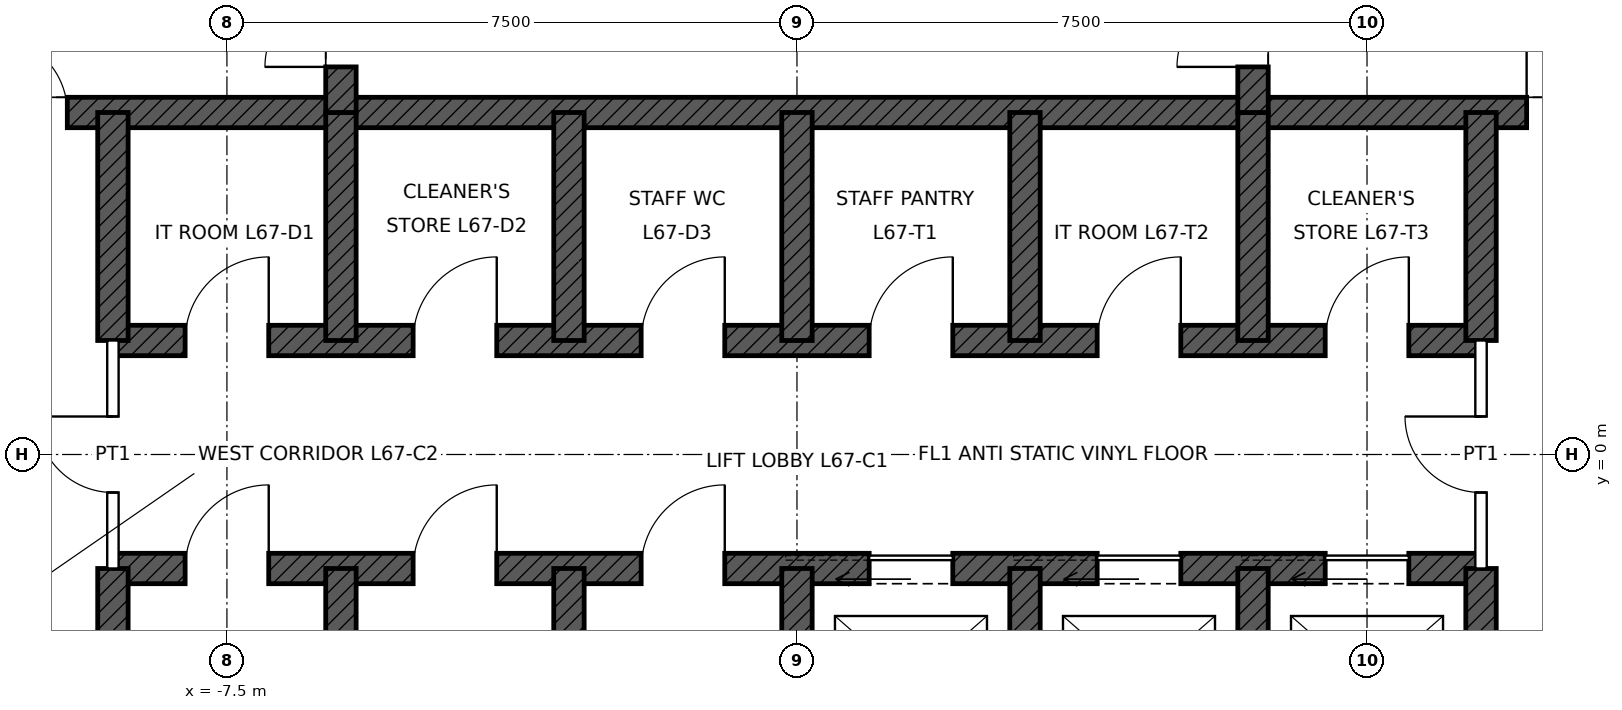
"""IFC4 building model, lengths in metres.
Left out: names, types, materials, properties, quantities, classifications, styles, units other than length and angle.
Written with IfcOpenShell. Run it as: python <this file> out.ifc"""

import sys

from ifc_helpers import new_model, si_unit, direction, frame, frame_2d, origin, place, context, subcontext, project, spatial, rectangle, extrude, element, fill, save


model = new_model("IFC4")
c1 = context("Model", 3, precision=1e-05, world=origin(), true_north=direction((0.0, 1.0)))
c2 = subcontext(c1, "Body", "Model", "MODEL_VIEW")
j1 = project(units=[si_unit("LENGTHUNIT", "METRE"), si_unit("PLANEANGLEUNIT", "RADIAN")], contexts=[c1])
p1 = place(None, origin())
s1 = spatial("IfcSite", under=j1, at=p1, CompositionType="ELEMENT")
p2 = place(p1, origin())
s2 = spatial("IfcBuilding", under=s1, at=p2, CompositionType="ELEMENT")
p3 = place(p2, frame((0.0, 0.0, 303.9)))
s3 = spatial("IfcBuildingStorey", under=s2, at=p3, CompositionType="ELEMENT", Elevation=303.9)
p4 = place(p3, frame((-11.0, 4.5, 0.0), z_axis=(0.0, 0.0, 1.0), x_axis=(1.0, 0.0, 0.0)))
e1 = element("IfcWall", 1, at=p4, inside=s3, PredefinedType="SHEAR", context=c2, shape_type="SweptSolid", body=[
    extrude(rectangle(XDim=22.0, YDim=0.4, at=frame_2d((11.0, 0.0))), origin(), (0.0, 0.0, 1.0), 4.0),
])
p5 = place(p4, frame((0.4, 0.0, 0.0)))
e2 = element("IfcOpeningElement", 2, at=p5, cuts=e1, PredefinedType="OPENING", context=c2, shape_type="SweptSolid", body=[
    extrude(rectangle(XDim=1.0, YDim=2.1, at=frame_2d((0.5, 1.05))), frame((0.0, 0.21, 0.0), z_axis=(0.0, -1.0, 0.0), x_axis=(1.0, 0.0, 0.0)), (0.0, 0.0, 1.0), 0.42),
])
p6 = place(p4, frame((20.6, 0.0, 0.0)))
e3 = element("IfcOpeningElement", 3, at=p6, cuts=e1, PredefinedType="OPENING", context=c2, shape_type="SweptSolid", body=[
    extrude(rectangle(XDim=1.0, YDim=2.1, at=frame_2d((0.5, 1.05))), frame((0.0, 0.21, 0.0), z_axis=(0.0, -1.0, 0.0), x_axis=(1.0, 0.0, 0.0)), (0.0, 0.0, 1.0), 0.42),
])
p7 = place(p3, frame((-9.0, 1.5, 0.0), z_axis=(0.0, 0.0, 1.0), x_axis=(1.0, 0.0, 0.0)))
e4 = element("IfcWall", 4, at=p7, inside=s3, PredefinedType="SHEAR", context=c2, shape_type="SweptSolid", body=[
    extrude(rectangle(XDim=18.0, YDim=0.4, at=frame_2d((9.0, 0.0))), origin(), (0.0, 0.0, 1.0), 4.0),
])
p8 = place(p7, frame((0.95, 0.0, 0.0)))
e5 = element("IfcOpeningElement", 5, at=p8, cuts=e4, PredefinedType="OPENING", context=c2, shape_type="SweptSolid", body=[
    extrude(rectangle(XDim=1.1, YDim=2.1, at=frame_2d((0.55, 1.05))), frame((0.0, 0.21, 0.0), z_axis=(0.0, -1.0, 0.0), x_axis=(1.0, 0.0, 0.0)), (0.0, 0.0, 1.0), 0.42),
])
p9 = place(p7, frame((3.95, 0.0, 0.0)))
e6 = element("IfcOpeningElement", 6, at=p9, cuts=e4, PredefinedType="OPENING", context=c2, shape_type="SweptSolid", body=[
    extrude(rectangle(XDim=1.1, YDim=2.1, at=frame_2d((0.55, 1.05))), frame((0.0, 0.21, 0.0), z_axis=(0.0, -1.0, 0.0), x_axis=(1.0, 0.0, 0.0)), (0.0, 0.0, 1.0), 0.42),
])
p10 = place(p7, frame((6.95, 0.0, 0.0)))
e7 = element("IfcOpeningElement", 7, at=p10, cuts=e4, PredefinedType="OPENING", context=c2, shape_type="SweptSolid", body=[
    extrude(rectangle(XDim=1.1, YDim=2.1, at=frame_2d((0.55, 1.05))), frame((0.0, 0.21, 0.0), z_axis=(0.0, -1.0, 0.0), x_axis=(1.0, 0.0, 0.0)), (0.0, 0.0, 1.0), 0.42),
])
p11 = place(p7, frame((9.95, 0.0, 0.0)))
e8 = element("IfcOpeningElement", 8, at=p11, cuts=e4, PredefinedType="OPENING", context=c2, shape_type="SweptSolid", body=[
    extrude(rectangle(XDim=1.1, YDim=2.1, at=frame_2d((0.55, 1.05))), frame((0.0, 0.21, 0.0), z_axis=(0.0, -1.0, 0.0), x_axis=(1.0, 0.0, 0.0)), (0.0, 0.0, 1.0), 0.42),
])
p12 = place(p7, frame((12.95, 0.0, 0.0)))
e9 = element("IfcOpeningElement", 9, at=p12, cuts=e4, PredefinedType="OPENING", context=c2, shape_type="SweptSolid", body=[
    extrude(rectangle(XDim=1.1, YDim=2.1, at=frame_2d((0.55, 1.05))), frame((0.0, 0.21, 0.0), z_axis=(0.0, -1.0, 0.0), x_axis=(1.0, 0.0, 0.0)), (0.0, 0.0, 1.0), 0.42),
])
p13 = place(p7, frame((15.95, 0.0, 0.0)))
e10 = element("IfcOpeningElement", 10, at=p13, cuts=e4, PredefinedType="OPENING", context=c2, shape_type="SweptSolid", body=[
    extrude(rectangle(XDim=1.1, YDim=2.1, at=frame_2d((0.55, 1.05))), frame((0.0, 0.21, 0.0), z_axis=(0.0, -1.0, 0.0), x_axis=(1.0, 0.0, 0.0)), (0.0, 0.0, 1.0), 0.42),
])
p14 = place(p3, frame((-9.0, -1.5, 0.0), z_axis=(0.0, 0.0, 1.0), x_axis=(1.0, 0.0, 0.0)))
e11 = element("IfcWall", 11, at=p14, inside=s3, PredefinedType="SHEAR", context=c2, shape_type="SweptSolid", body=[
    extrude(rectangle(XDim=18.0, YDim=0.4, at=frame_2d((9.0, 0.0))), origin(), (0.0, 0.0, 1.0), 4.0),
])
p15 = place(p14, frame((9.95, 0.0, 0.0)))
e12 = element("IfcOpeningElement", 12, at=p15, cuts=e11, PredefinedType="OPENING", context=c2, shape_type="SweptSolid", body=[
    extrude(rectangle(XDim=1.1, YDim=2.1, at=frame_2d((0.55, 1.05))), frame((0.0, 0.21, 0.0), z_axis=(0.0, -1.0, 0.0), x_axis=(1.0, 0.0, 0.0)), (0.0, 0.0, 1.0), 0.42),
])
p16 = place(p14, frame((12.95, 0.0, 0.0)))
e13 = element("IfcOpeningElement", 13, at=p16, cuts=e11, PredefinedType="OPENING", context=c2, shape_type="SweptSolid", body=[
    extrude(rectangle(XDim=1.1, YDim=2.1, at=frame_2d((0.55, 1.05))), frame((0.0, 0.21, 0.0), z_axis=(0.0, -1.0, 0.0), x_axis=(1.0, 0.0, 0.0)), (0.0, 0.0, 1.0), 0.42),
])
p17 = place(p14, frame((15.95, 0.0, 0.0)))
e14 = element("IfcOpeningElement", 14, at=p17, cuts=e11, PredefinedType="OPENING", context=c2, shape_type="SweptSolid", body=[
    extrude(rectangle(XDim=1.1, YDim=2.1, at=frame_2d((0.55, 1.05))), frame((0.0, 0.21, 0.0), z_axis=(0.0, -1.0, 0.0), x_axis=(1.0, 0.0, 0.0)), (0.0, 0.0, 1.0), 0.42),
])
p18 = place(p14, frame((0.95, 0.0, 0.0)))
e15 = element("IfcOpeningElement", 15, at=p18, cuts=e11, PredefinedType="OPENING", context=c2, shape_type="SweptSolid", body=[
    extrude(rectangle(XDim=1.1, YDim=2.1, at=frame_2d((0.55, 1.05))), frame((0.0, 0.21, 0.0), z_axis=(0.0, -1.0, 0.0), x_axis=(1.0, 0.0, 0.0)), (0.0, 0.0, 1.0), 0.42),
])
p19 = place(p14, frame((3.95, 0.0, 0.0)))
e16 = element("IfcOpeningElement", 16, at=p19, cuts=e11, PredefinedType="OPENING", context=c2, shape_type="SweptSolid", body=[
    extrude(rectangle(XDim=1.1, YDim=2.1, at=frame_2d((0.55, 1.05))), frame((0.0, 0.21, 0.0), z_axis=(0.0, -1.0, 0.0), x_axis=(1.0, 0.0, 0.0)), (0.0, 0.0, 1.0), 0.42),
])
p20 = place(p14, frame((6.95, 0.0, 0.0)))
e17 = element("IfcOpeningElement", 17, at=p20, cuts=e11, PredefinedType="OPENING", context=c2, shape_type="SweptSolid", body=[
    extrude(rectangle(XDim=1.1, YDim=2.1, at=frame_2d((0.55, 1.05))), frame((0.0, 0.21, 0.0), z_axis=(0.0, -1.0, 0.0), x_axis=(1.0, 0.0, 0.0)), (0.0, 0.0, 1.0), 0.42),
])
for number, where, z_axis, x_axis in (
    (18, (-9.0, 1.5, 0.0), (0.0, 0.0, 1.0), (0.0, 1.0, 0.0)),
    (19, (9.0, 1.5, 0.0), (0.0, 0.0, 1.0), (0.0, 1.0, 0.0)),
    (20, (-9.0, -4.5, 0.0), (0.0, 0.0, 1.0), (0.0, 1.0, 0.0)),
    (21, (9.0, -4.5, 0.0), (0.0, 0.0, 1.0), (0.0, 1.0, 0.0)),
    (22, (-6.0, 1.5, 0.0), (0.0, 0.0, 1.0), (0.0, 1.0, 0.0)),
    (23, (-3.0, 1.5, 0.0), (0.0, 0.0, 1.0), (0.0, 1.0, 0.0)),
    (24, (0.0, 1.5, 0.0), (0.0, 0.0, 1.0), (0.0, 1.0, 0.0)),
    (25, (3.0, 1.5, 0.0), (0.0, 0.0, 1.0), (0.0, 1.0, 0.0)),
    (26, (6.0, 1.5, 0.0), (0.0, 0.0, 1.0), (0.0, 1.0, 0.0)),
    (27, (-6.0, -4.5, 0.0), (0.0, 0.0, 1.0), (0.0, 1.0, 0.0)),
    (28, (-3.0, -4.5, 0.0), (0.0, 0.0, 1.0), (0.0, 1.0, 0.0)),
    (29, (0.0, -4.5, 0.0), (0.0, 0.0, 1.0), (0.0, 1.0, 0.0)),
    (30, (3.0, -4.5, 0.0), (0.0, 0.0, 1.0), (0.0, 1.0, 0.0)),
    (31, (6.0, -4.5, 0.0), (0.0, 0.0, 1.0), (0.0, 1.0, 0.0)),
):
    element("IfcWall", number, at=place(p3, frame(where, z_axis=z_axis, x_axis=x_axis)), inside=s3, PredefinedType="SHEAR", context=c2, shape_type="SweptSolid", body=[
        extrude(rectangle(XDim=3.0, YDim=0.4, at=frame_2d((1.5, 0.0))), origin(), (0.0, 0.0, 1.0), 4.0),
    ])
p21 = place(p3, frame((-6.0, 4.5, 0.0), z_axis=(0.0, 0.0, 1.0), x_axis=(0.0, 1.0, 0.0)))
e32 = element("IfcWall", 32, at=p21, inside=s3, PredefinedType="SHEAR", context=c2, shape_type="SweptSolid", body=[
    extrude(rectangle(XDim=6.5, YDim=0.4, at=frame_2d((3.25, 0.0))), origin(), (0.0, 0.0, 1.0), 4.0),
])
p22 = place(p21, frame((0.6, 0.0, 0.0)))
e33 = element("IfcOpeningElement", 33, at=p22, cuts=e32, PredefinedType="OPENING", context=c2, shape_type="SweptSolid", body=[
    extrude(rectangle(XDim=1.0, YDim=2.1, at=frame_2d((0.5, 1.05))), frame((0.0, 0.21, 0.0), z_axis=(0.0, -1.0, 0.0), x_axis=(1.0, 0.0, 0.0)), (0.0, 0.0, 1.0), 0.42),
])
p23 = place(p3, frame((6.0, 4.5, 0.0), z_axis=(0.0, 0.0, 1.0), x_axis=(0.0, 1.0, 0.0)))
e34 = element("IfcWall", 34, at=p23, inside=s3, PredefinedType="SHEAR", context=c2, shape_type="SweptSolid", body=[
    extrude(rectangle(XDim=6.5, YDim=0.4, at=frame_2d((3.25, 0.0))), origin(), (0.0, 0.0, 1.0), 4.0),
])
p24 = place(p23, frame((0.6, 0.0, 0.0)))
e35 = element("IfcOpeningElement", 35, at=p24, cuts=e34, PredefinedType="OPENING", context=c2, shape_type="SweptSolid", body=[
    extrude(rectangle(XDim=1.0, YDim=2.1, at=frame_2d((0.5, 1.05))), frame((0.0, 0.21, 0.0), z_axis=(0.0, -1.0, 0.0), x_axis=(1.0, 0.0, 0.0)), (0.0, 0.0, 1.0), 0.42),
])
p25 = place(p3, frame((-9.0, -1.5, 0.0), z_axis=(0.0, 0.0, 1.0), x_axis=(0.0, 1.0, 0.0)))
e36 = element("IfcWall", 36, at=p25, inside=s3, PredefinedType="PARTITIONING", context=c2, shape_type="SweptSolid", body=[
    extrude(rectangle(XDim=3.0, YDim=0.15, at=frame_2d((1.5, 0.0))), origin(), (0.0, 0.0, 1.0), 3.75),
])
p26 = place(p25, frame((1.0, 0.0, 0.0)))
e37 = element("IfcOpeningElement", 37, at=p26, cuts=e36, PredefinedType="OPENING", context=c2, shape_type="SweptSolid", body=[
    extrude(rectangle(XDim=1.0, YDim=2.4, at=frame_2d((0.5, 1.2))), frame((0.0, 0.085, 0.0), z_axis=(0.0, -1.0, 0.0), x_axis=(1.0, 0.0, 0.0)), (0.0, 0.0, 1.0), 0.17),
])
p27 = place(p3, frame((9.0, -1.5, 0.0), z_axis=(0.0, 0.0, 1.0), x_axis=(0.0, 1.0, 0.0)))
e38 = element("IfcWall", 38, at=p27, inside=s3, PredefinedType="PARTITIONING", context=c2, shape_type="SweptSolid", body=[
    extrude(rectangle(XDim=3.0, YDim=0.15, at=frame_2d((1.5, 0.0))), origin(), (0.0, 0.0, 1.0), 3.75),
])
p28 = place(p27, frame((1.0, 0.0, 0.0)))
e39 = element("IfcOpeningElement", 39, at=p28, cuts=e38, PredefinedType="OPENING", context=c2, shape_type="SweptSolid", body=[
    extrude(rectangle(XDim=1.0, YDim=2.4, at=frame_2d((0.5, 1.2))), frame((0.0, 0.085, 0.0), z_axis=(0.0, -1.0, 0.0), x_axis=(1.0, 0.0, 0.0)), (0.0, 0.0, 1.0), 0.17),
])
p29 = place(p5, origin())
e40 = element("IfcDoor", 40, at=p29, inside=s3, OperationType="SINGLE_SWING_LEFT", PredefinedType="DOOR", context=c2, shape_type="SweptSolid", body=[
    extrude(rectangle(XDim=1.0, YDim=2.1, at=frame_2d((0.5, 1.05))), frame((0.0, 0.025, 0.0), z_axis=(0.0, -1.0, 0.0), x_axis=(1.0, 0.0, 0.0)), (0.0, 0.0, 1.0), 0.05),
])
fill(e2, e40)
p30 = place(p6, origin())
e41 = element("IfcDoor", 41, at=p30, inside=s3, OperationType="SINGLE_SWING_LEFT", PredefinedType="DOOR", context=c2, shape_type="SweptSolid", body=[
    extrude(rectangle(XDim=1.0, YDim=2.1, at=frame_2d((0.5, 1.05))), frame((0.0, 0.025, 0.0), z_axis=(0.0, -1.0, 0.0), x_axis=(1.0, 0.0, 0.0)), (0.0, 0.0, 1.0), 0.05),
])
fill(e3, e41)
p31 = place(p22, origin())
e42 = element("IfcDoor", 42, at=p31, inside=s3, OperationType="SINGLE_SWING_LEFT", PredefinedType="DOOR", context=c2, shape_type="SweptSolid", body=[
    extrude(rectangle(XDim=1.0, YDim=2.1, at=frame_2d((0.5, 1.05))), frame((0.0, 0.025, 0.0), z_axis=(0.0, -1.0, 0.0), x_axis=(1.0, 0.0, 0.0)), (0.0, 0.0, 1.0), 0.05),
])
fill(e33, e42)
p32 = place(p24, origin())
e43 = element("IfcDoor", 43, at=p32, inside=s3, OperationType="SINGLE_SWING_LEFT", PredefinedType="DOOR", context=c2, shape_type="SweptSolid", body=[
    extrude(rectangle(XDim=1.0, YDim=2.1, at=frame_2d((0.5, 1.05))), frame((0.0, 0.025, 0.0), z_axis=(0.0, -1.0, 0.0), x_axis=(1.0, 0.0, 0.0)), (0.0, 0.0, 1.0), 0.05),
])
fill(e35, e43)
p33 = place(p15, origin())
e44 = element("IfcDoor", 44, at=p33, inside=s3, OperationType="SLIDING_TO_LEFT", PredefinedType="DOOR", context=c2, shape_type="SweptSolid", body=[
    extrude(rectangle(XDim=1.1, YDim=2.1, at=frame_2d((0.55, 1.05))), frame((0.0, 0.025, 0.0), z_axis=(0.0, -1.0, 0.0), x_axis=(1.0, 0.0, 0.0)), (0.0, 0.0, 1.0), 0.05),
])
fill(e12, e44)
p34 = place(p16, origin())
e45 = element("IfcDoor", 45, at=p34, inside=s3, OperationType="SLIDING_TO_LEFT", PredefinedType="DOOR", context=c2, shape_type="SweptSolid", body=[
    extrude(rectangle(XDim=1.1, YDim=2.1, at=frame_2d((0.55, 1.05))), frame((0.0, 0.025, 0.0), z_axis=(0.0, -1.0, 0.0), x_axis=(1.0, 0.0, 0.0)), (0.0, 0.0, 1.0), 0.05),
])
fill(e13, e45)
p35 = place(p17, origin())
e46 = element("IfcDoor", 46, at=p35, inside=s3, OperationType="SLIDING_TO_LEFT", PredefinedType="DOOR", context=c2, shape_type="SweptSolid", body=[
    extrude(rectangle(XDim=1.1, YDim=2.1, at=frame_2d((0.55, 1.05))), frame((0.0, 0.025, 0.0), z_axis=(0.0, -1.0, 0.0), x_axis=(1.0, 0.0, 0.0)), (0.0, 0.0, 1.0), 0.05),
])
fill(e14, e46)
p36 = place(p26, origin())
e47 = element("IfcDoor", 47, at=p36, inside=s3, OperationType="SINGLE_SWING_RIGHT", PredefinedType="DOOR", context=c2, shape_type="SweptSolid", body=[
    extrude(rectangle(XDim=1.0, YDim=2.4, at=frame_2d((0.5, 1.2))), frame((0.0, 0.025, 0.0), z_axis=(0.0, -1.0, 0.0), x_axis=(1.0, 0.0, 0.0)), (0.0, 0.0, 1.0), 0.05),
])
fill(e37, e47)
p37 = place(p28, origin())
e48 = element("IfcDoor", 48, at=p37, inside=s3, OperationType="SINGLE_SWING_RIGHT", PredefinedType="DOOR", context=c2, shape_type="SweptSolid", body=[
    extrude(rectangle(XDim=1.0, YDim=2.4, at=frame_2d((0.5, 1.2))), frame((0.0, 0.025, 0.0), z_axis=(0.0, -1.0, 0.0), x_axis=(1.0, 0.0, 0.0)), (0.0, 0.0, 1.0), 0.05),
])
fill(e39, e48)
p38 = place(p8, origin())
e49 = element("IfcDoor", 49, at=p38, inside=s3, OperationType="SINGLE_SWING_RIGHT", PredefinedType="DOOR", context=c2, shape_type="SweptSolid", body=[
    extrude(rectangle(XDim=1.1, YDim=2.1, at=frame_2d((0.55, 1.05))), frame((0.0, 0.025, 0.0), z_axis=(0.0, -1.0, 0.0), x_axis=(1.0, 0.0, 0.0)), (0.0, 0.0, 1.0), 0.05),
])
fill(e5, e49)
p39 = place(p9, origin())
e50 = element("IfcDoor", 50, at=p39, inside=s3, OperationType="SINGLE_SWING_RIGHT", PredefinedType="DOOR", context=c2, shape_type="SweptSolid", body=[
    extrude(rectangle(XDim=1.1, YDim=2.1, at=frame_2d((0.55, 1.05))), frame((0.0, 0.025, 0.0), z_axis=(0.0, -1.0, 0.0), x_axis=(1.0, 0.0, 0.0)), (0.0, 0.0, 1.0), 0.05),
])
fill(e6, e50)
p40 = place(p10, origin())
e51 = element("IfcDoor", 51, at=p40, inside=s3, OperationType="SINGLE_SWING_RIGHT", PredefinedType="DOOR", context=c2, shape_type="SweptSolid", body=[
    extrude(rectangle(XDim=1.1, YDim=2.1, at=frame_2d((0.55, 1.05))), frame((0.0, 0.025, 0.0), z_axis=(0.0, -1.0, 0.0), x_axis=(1.0, 0.0, 0.0)), (0.0, 0.0, 1.0), 0.05),
])
fill(e7, e51)
p41 = place(p11, origin())
e52 = element("IfcDoor", 52, at=p41, inside=s3, OperationType="SINGLE_SWING_RIGHT", PredefinedType="DOOR", context=c2, shape_type="SweptSolid", body=[
    extrude(rectangle(XDim=1.1, YDim=2.1, at=frame_2d((0.55, 1.05))), frame((0.0, 0.025, 0.0), z_axis=(0.0, -1.0, 0.0), x_axis=(1.0, 0.0, 0.0)), (0.0, 0.0, 1.0), 0.05),
])
fill(e8, e52)
p42 = place(p12, origin())
e53 = element("IfcDoor", 53, at=p42, inside=s3, OperationType="SINGLE_SWING_RIGHT", PredefinedType="DOOR", context=c2, shape_type="SweptSolid", body=[
    extrude(rectangle(XDim=1.1, YDim=2.1, at=frame_2d((0.55, 1.05))), frame((0.0, 0.025, 0.0), z_axis=(0.0, -1.0, 0.0), x_axis=(1.0, 0.0, 0.0)), (0.0, 0.0, 1.0), 0.05),
])
fill(e9, e53)
p43 = place(p13, origin())
e54 = element("IfcDoor", 54, at=p43, inside=s3, OperationType="SINGLE_SWING_RIGHT", PredefinedType="DOOR", context=c2, shape_type="SweptSolid", body=[
    extrude(rectangle(XDim=1.1, YDim=2.1, at=frame_2d((0.55, 1.05))), frame((0.0, 0.025, 0.0), z_axis=(0.0, -1.0, 0.0), x_axis=(1.0, 0.0, 0.0)), (0.0, 0.0, 1.0), 0.05),
])
fill(e10, e54)
p44 = place(p18, origin())
e55 = element("IfcDoor", 55, at=p44, inside=s3, OperationType="SINGLE_SWING_RIGHT", PredefinedType="DOOR", context=c2, shape_type="SweptSolid", body=[
    extrude(rectangle(XDim=1.1, YDim=2.1, at=frame_2d((0.55, 1.05))), frame((0.0, 0.025, 0.0), z_axis=(0.0, -1.0, 0.0), x_axis=(1.0, 0.0, 0.0)), (0.0, 0.0, 1.0), 0.05),
])
fill(e15, e55)
p45 = place(p19, origin())
e56 = element("IfcDoor", 56, at=p45, inside=s3, OperationType="SINGLE_SWING_RIGHT", PredefinedType="DOOR", context=c2, shape_type="SweptSolid", body=[
    extrude(rectangle(XDim=1.1, YDim=2.1, at=frame_2d((0.55, 1.05))), frame((0.0, 0.025, 0.0), z_axis=(0.0, -1.0, 0.0), x_axis=(1.0, 0.0, 0.0)), (0.0, 0.0, 1.0), 0.05),
])
fill(e16, e56)
p46 = place(p20, origin())
e57 = element("IfcDoor", 57, at=p46, inside=s3, OperationType="SINGLE_SWING_RIGHT", PredefinedType="DOOR", context=c2, shape_type="SweptSolid", body=[
    extrude(rectangle(XDim=1.1, YDim=2.1, at=frame_2d((0.55, 1.05))), frame((0.0, 0.025, 0.0), z_axis=(0.0, -1.0, 0.0), x_axis=(1.0, 0.0, 0.0)), (0.0, 0.0, 1.0), 0.05),
])
fill(e17, e57)
save(model, sys.argv[1])
